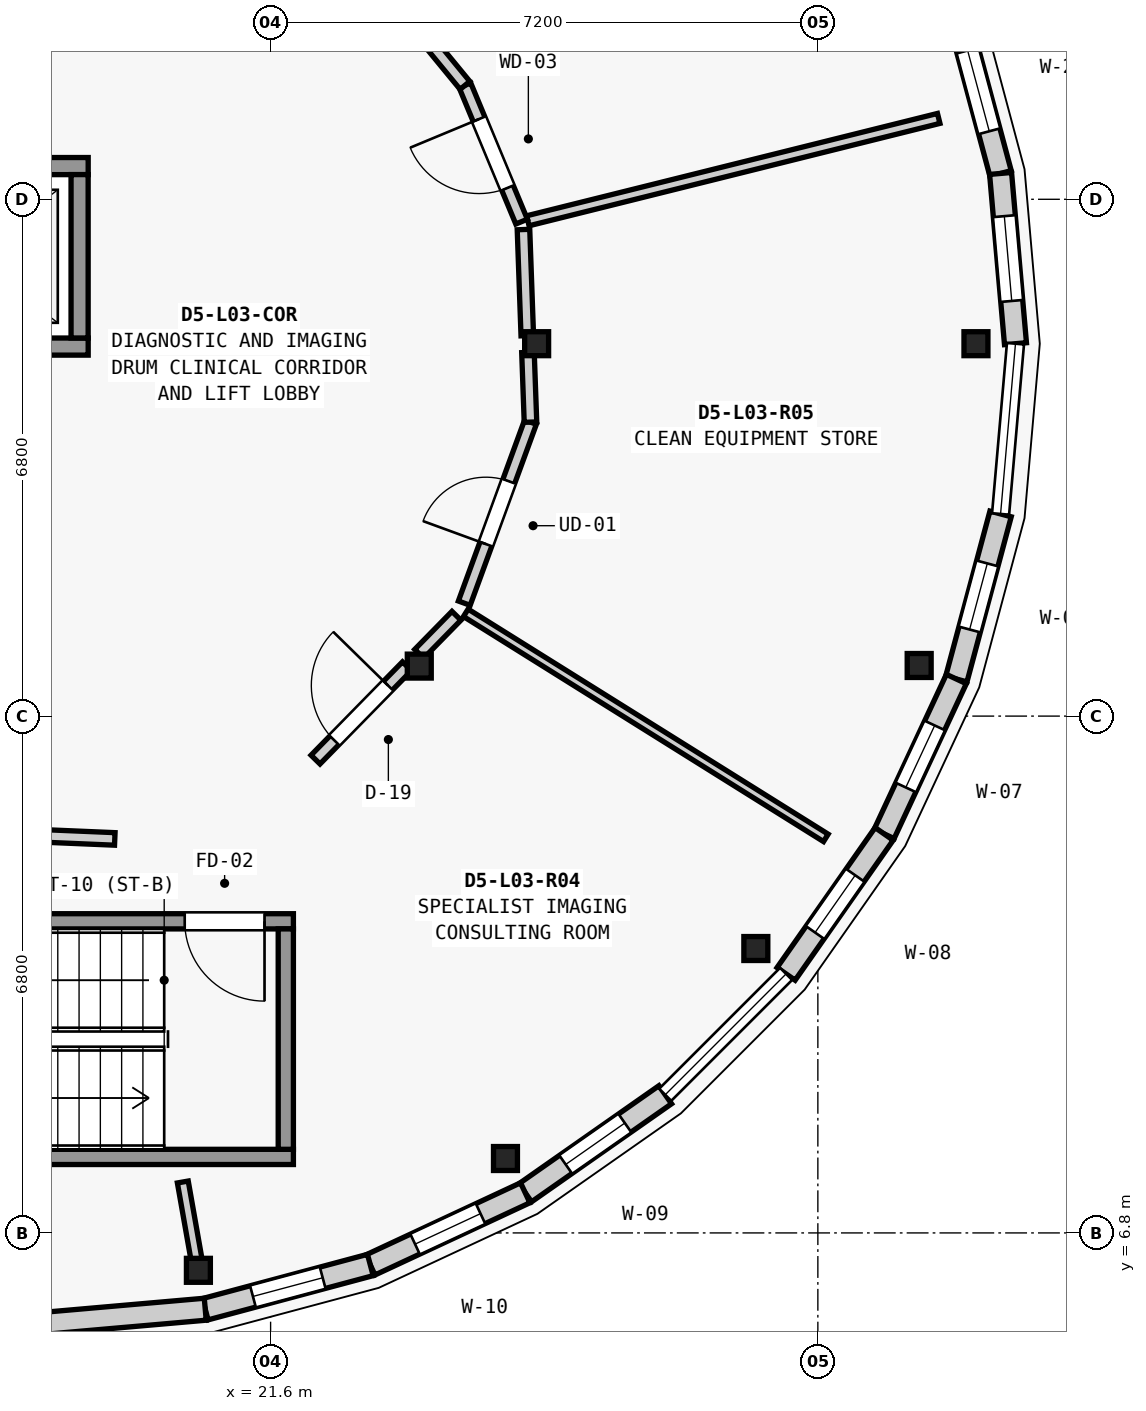
"""IFC4 building model, lengths in metres.
Left out: names, types, materials, properties, quantities, classifications, styles, units other than length and angle.
Written with IfcOpenShell. Run it as: python <this file> out.ifc"""

import sys

from ifc_helpers import new_model, si_unit, direction, frame, frame_2d, origin, origin_2d, place, context, subcontext, project, spatial, rectangle, extrude, element, fill, save


model = new_model("IFC4")
c1 = context("Model", 3, precision=1e-05, world=origin(), true_north=direction((0.0, 1.0)))
c2 = subcontext(c1, "Body", "Model", "MODEL_VIEW")
j1 = project(units=[si_unit("LENGTHUNIT", "METRE"), si_unit("PLANEANGLEUNIT", "RADIAN")], contexts=[c1])
p1 = place(None, origin())
s1 = spatial("IfcSite", under=j1, at=p1, CompositionType="ELEMENT")
p2 = place(p1, origin())
s2 = spatial("IfcBuilding", under=s1, at=p2, CompositionType="ELEMENT")
p3 = place(p2, frame((0.0, 0.0, 12.95)))
s3 = spatial("IfcBuildingStorey", under=s2, at=p3, CompositionType="ELEMENT", Elevation=12.95)
for number, where, z_axis, x_axis in (
    (1, (30.88, 18.5, 0.0), (0.0, 0.0, 1.0), (1.0, 0.0, 0.0)),
    (2, (20.65, 6.308, 0.0), (0.0, 0.0, 1.0), (1.0, 0.0, 0.0)),
    (3, (24.69, 7.779, 0.0), (0.0, 0.0, 1.0), (1.0, 0.0, 0.0)),
    (4, (27.984, 10.542, 0.0), (0.0, 0.0, 1.0), (1.0, 0.0, 0.0)),
    (5, (30.133, 14.266, 0.0), (0.0, 0.0, 1.0), (1.0, 0.0, 0.0)),
    (6, (25.1, 18.5, 0.0), (0.0, 0.0, 1.0), (1.0, 0.0, 0.0)),
    (7, (23.556, 14.258, 0.0), (0.0, 0.0, 1.0), (1.0, 0.0, 0.0)),
):
    element("IfcColumn", number, at=place(p3, frame(where, z_axis=z_axis, x_axis=x_axis)), inside=s3, PredefinedType="COLUMN", context=c2, shape_type="SweptSolid", body=[
        extrude(rectangle(XDim=0.315, YDim=0.315, at=origin_2d()), origin(), (0.0, 0.0, 1.0), 4.2),
    ])
p4 = place(p3, frame((31.204, 16.26, 0.0), z_axis=(0.0, 0.0, 1.0), x_axis=(-0.258824721145, -0.96592430538, 0.0)))
e8 = element("IfcWall", 8, at=p4, inside=s3, PredefinedType="ELEMENTEDWALL", context=c2, shape_type="SweptSolid", body=[
    extrude(rectangle(XDim=2.249, YDim=0.29, at=frame_2d((1.125, 0.0))), origin(), (0.0, 0.0, 1.0), 3.349),
])
p5 = place(p4, frame((0.674, 0.0, 0.85)))
e9 = element("IfcOpeningElement", 9, at=p5, cuts=e8, PredefinedType="OPENING", context=c2, shape_type="SweptSolid", body=[
    extrude(rectangle(XDim=0.9, YDim=1.65, at=frame_2d((0.45, 0.825))), frame((0.0, 0.155, 0.0), z_axis=(0.0, -1.0, 0.0), x_axis=(1.0, 0.0, 0.0)), (0.0, 0.0, 1.0), 0.31),
])
p6 = place(p3, frame((30.622, 14.088, 0.0), z_axis=(0.0, 0.0, 1.0), x_axis=(-0.422504983593, -0.906360600886, 0.0)))
e10 = element("IfcWall", 10, at=p6, inside=s3, PredefinedType="ELEMENTEDWALL", context=c2, shape_type="SweptSolid", body=[
    extrude(rectangle(XDim=2.248, YDim=0.29, at=frame_2d((1.124, 0.0))), origin(), (0.0, 0.0, 1.0), 3.349),
])
p7 = place(p6, frame((0.674, 0.0, 0.85)))
e11 = element("IfcOpeningElement", 11, at=p7, cuts=e10, PredefinedType="OPENING", context=c2, shape_type="SweptSolid", body=[
    extrude(rectangle(XDim=0.9, YDim=1.9, at=frame_2d((0.45, 0.95))), frame((0.0, 0.155, 0.0), z_axis=(0.0, -1.0, 0.0), x_axis=(1.0, 0.0, 0.0)), (0.0, 0.0, 1.0), 0.31),
])
p8 = place(p3, frame((29.672, 12.05, 0.0), z_axis=(0.0, 0.0, 1.0), x_axis=(-0.573644482107, -0.819104393925, 0.0)))
e12 = element("IfcWall", 12, at=p8, inside=s3, PredefinedType="ELEMENTEDWALL", context=c2, shape_type="SweptSolid", body=[
    extrude(rectangle(XDim=2.249, YDim=0.29, at=frame_2d((1.125, 0.0))), origin(), (0.0, 0.0, 1.0), 3.349),
])
p9 = place(p8, frame((0.664, 0.0, 0.85)))
e13 = element("IfcOpeningElement", 13, at=p9, cuts=e12, PredefinedType="OPENING", context=c2, shape_type="SweptSolid", body=[
    extrude(rectangle(XDim=0.92, YDim=1.55, at=frame_2d((0.46, 0.775))), frame((0.0, 0.155, 0.0), z_axis=(0.0, -1.0, 0.0), x_axis=(1.0, 0.0, 0.0)), (0.0, 0.0, 1.0), 0.31),
])
p10 = place(p3, frame((26.792, 8.618, 0.0), z_axis=(0.0, 0.0, 1.0), x_axis=(-0.819104393925, -0.573644482107, 0.0)))
e14 = element("IfcWall", 14, at=p10, inside=s3, PredefinedType="ELEMENTEDWALL", context=c2, shape_type="SweptSolid", body=[
    extrude(rectangle(XDim=2.249, YDim=0.29, at=frame_2d((1.125, 0.0))), origin(), (0.0, 0.0, 1.0), 3.349),
])
p11 = place(p10, frame((0.649, 0.0, 0.85)))
e15 = element("IfcOpeningElement", 15, at=p11, cuts=e14, PredefinedType="OPENING", context=c2, shape_type="SweptSolid", body=[
    extrude(rectangle(XDim=0.95, YDim=1.35, at=frame_2d((0.475, 0.675))), frame((0.0, 0.155, 0.0), z_axis=(0.0, -1.0, 0.0), x_axis=(1.0, 0.0, 0.0)), (0.0, 0.0, 1.0), 0.31),
])
p12 = place(p3, frame((24.95, 7.328, 0.0), z_axis=(0.0, 0.0, 1.0), x_axis=(-0.906360600886, -0.422504983593, 0.0)))
e16 = element("IfcWall", 16, at=p12, inside=s3, PredefinedType="ELEMENTEDWALL", context=c2, shape_type="SweptSolid", body=[
    extrude(rectangle(XDim=2.248, YDim=0.29, at=frame_2d((1.124, 0.0))), origin(), (0.0, 0.0, 1.0), 3.349),
])
p13 = place(p12, frame((0.649, 0.0, 0.85)))
e17 = element("IfcOpeningElement", 17, at=p13, cuts=e16, PredefinedType="OPENING", context=c2, shape_type="SweptSolid", body=[
    extrude(rectangle(XDim=0.95, YDim=1.6, at=frame_2d((0.475, 0.8))), frame((0.0, 0.155, 0.0), z_axis=(0.0, -1.0, 0.0), x_axis=(1.0, 0.0, 0.0)), (0.0, 0.0, 1.0), 0.31),
])
p14 = place(p3, frame((22.912, 6.378, 0.0), z_axis=(0.0, 0.0, 1.0), x_axis=(-0.96592430538, -0.258824721145, 0.0)))
e18 = element("IfcWall", 18, at=p14, inside=s3, PredefinedType="ELEMENTEDWALL", context=c2, shape_type="SweptSolid", body=[
    extrude(rectangle(XDim=2.249, YDim=0.29, at=frame_2d((1.125, 0.0))), origin(), (0.0, 0.0, 1.0), 3.349),
])
p15 = place(p14, frame((0.649, 0.0, 0.85)))
e19 = element("IfcOpeningElement", 19, at=p15, cuts=e18, PredefinedType="OPENING", context=c2, shape_type="SweptSolid", body=[
    extrude(rectangle(XDim=0.95, YDim=1.8, at=frame_2d((0.475, 0.9))), frame((0.0, 0.155, 0.0), z_axis=(0.0, -1.0, 0.0), x_axis=(1.0, 0.0, 0.0)), (0.0, 0.0, 1.0), 0.31),
])
p16 = place(p3, frame((20.74, 5.796, 0.0), z_axis=(0.0, 0.0, 1.0), x_axis=(-0.996201374201, -0.087079400775, 0.0)))
e20 = element("IfcWall", 20, at=p16, inside=s3, PredefinedType="ELEMENTEDWALL", context=c2, shape_type="SweptSolid", body=[
    extrude(rectangle(XDim=2.249, YDim=0.29, at=frame_2d((1.124, 0.0))), origin(), (0.0, 0.0, 1.0), 3.349),
])
p17 = place(p3, frame((30.622, 22.912, 0.0), z_axis=(0.0, 0.0, 1.0), x_axis=(0.258824721145, -0.96592430538, 0.0)))
e21 = element("IfcWall", 21, at=p17, inside=s3, PredefinedType="ELEMENTEDWALL", context=c2, shape_type="SweptSolid", body=[
    extrude(rectangle(XDim=2.249, YDim=0.29, at=frame_2d((1.125, 0.0))), origin(), (0.0, 0.0, 1.0), 3.349),
])
p18 = place(p17, frame((0.574, 0.0, 0.85)))
e22 = element("IfcOpeningElement", 22, at=p18, cuts=e21, PredefinedType="OPENING", context=c2, shape_type="SweptSolid", body=[
    extrude(rectangle(XDim=1.1, YDim=2.1, at=frame_2d((0.55, 1.05))), frame((0.0, 0.155, 0.0), z_axis=(0.0, -1.0, 0.0), x_axis=(1.0, 0.0, 0.0)), (0.0, 0.0, 1.0), 0.31),
])
p19 = place(p3, frame((31.204, 20.74, 0.0), z_axis=(0.0, 0.0, 1.0), x_axis=(0.087079400775, -0.996201374201, 0.0)))
e23 = element("IfcWall", 23, at=p19, inside=s3, PredefinedType="ELEMENTEDWALL", context=c2, shape_type="SweptSolid", body=[
    extrude(rectangle(XDim=2.249, YDim=0.29, at=frame_2d((1.124, 0.0))), origin(), (0.0, 0.0, 1.0), 3.349),
])
p20 = place(p19, frame((0.564, 0.0, 0.85)))
e24 = element("IfcOpeningElement", 24, at=p20, cuts=e23, PredefinedType="OPENING", context=c2, shape_type="SweptSolid", body=[
    extrude(rectangle(XDim=1.12, YDim=1.65, at=frame_2d((0.56, 0.825))), frame((0.0, 0.155, 0.0), z_axis=(0.0, -1.0, 0.0), x_axis=(1.0, 0.0, 0.0)), (0.0, 0.0, 1.0), 0.31),
])
p21 = place(p3, frame((21.9, 10.9, 0.0), z_axis=(0.0, 0.0, 1.0), x_axis=(-1.0, 0.0, 0.0)))
e25 = element("IfcWall", 25, at=p21, inside=s3, PredefinedType="SHEAR", context=c2, shape_type="SweptSolid", body=[
    extrude(rectangle(XDim=6.8, YDim=0.2, at=frame_2d((3.4, 0.0))), origin(), (0.0, 0.0, 1.0), 3.995),
])
p22 = place(p21, frame((0.38, 0.0, 0.0)))
e26 = element("IfcOpeningElement", 26, at=p22, cuts=e25, PredefinedType="OPENING", context=c2, shape_type="SweptSolid", body=[
    extrude(rectangle(XDim=1.05, YDim=2.15, at=frame_2d((0.525, 1.075))), frame((0.0, 0.11, 0.0), z_axis=(0.0, -1.0, 0.0), x_axis=(1.0, 0.0, 0.0)), (0.0, 0.0, 1.0), 0.22),
])
p23 = place(p3, frame((21.9, 7.8, 0.0), z_axis=(0.0, 0.0, 1.0), x_axis=(-1.0, 0.0, 0.0)))
e27 = element("IfcWall", 27, at=p23, inside=s3, PredefinedType="SHEAR", context=c2, shape_type="SweptSolid", body=[
    extrude(rectangle(XDim=6.8, YDim=0.2, at=frame_2d((3.4, 0.0))), origin(), (0.0, 0.0, 1.0), 3.995),
])
p24 = place(p3, frame((21.8, 10.8, 0.0), z_axis=(0.0, 0.0, 1.0), x_axis=(0.0, -1.0, 0.0)))
e28 = element("IfcWall", 28, at=p24, inside=s3, PredefinedType="SHEAR", context=c2, shape_type="SweptSolid", body=[
    extrude(rectangle(XDim=2.9, YDim=0.2, at=frame_2d((1.45, 0.0))), origin(), (0.0, 0.0, 1.0), 3.995),
])
p25 = place(p3, frame((16.1, 18.462, 0.0), z_axis=(0.0, 0.0, 1.0), x_axis=(1.0, 0.0, 0.0)))
e29 = element("IfcWall", 29, at=p25, inside=s3, PredefinedType="SHEAR", context=c2, shape_type="SweptSolid", body=[
    extrude(rectangle(XDim=3.1, YDim=0.225, at=frame_2d((1.55, 0.0))), origin(), (0.0, 0.0, 1.0), 3.995),
])
p26 = place(p25, frame((0.9, 0.0, 0.0)))
e30 = element("IfcOpeningElement", 30, at=p26, cuts=e29, PredefinedType="OPENING", context=c2, shape_type="SweptSolid", body=[
    extrude(rectangle(XDim=1.3, YDim=2.2, at=frame_2d((0.65, 1.1))), frame((0.0, 0.123, 0.0), z_axis=(0.0, -1.0, 0.0), x_axis=(1.0, 0.0, 0.0)), (0.0, 0.0, 1.0), 0.245),
])
p27 = place(p3, frame((16.1, 20.837, 0.0), z_axis=(0.0, 0.0, 1.0), x_axis=(1.0, 0.0, 0.0)))
e31 = element("IfcWall", 31, at=p27, inside=s3, PredefinedType="SHEAR", context=c2, shape_type="SweptSolid", body=[
    extrude(rectangle(XDim=3.1, YDim=0.225, at=frame_2d((1.55, 0.0))), origin(), (0.0, 0.0, 1.0), 3.995),
])
p28 = place(p3, frame((19.087, 18.575, 0.0), z_axis=(0.0, 0.0, 1.0), x_axis=(0.0, 1.0, 0.0)))
e32 = element("IfcWall", 32, at=p28, inside=s3, PredefinedType="SHEAR", context=c2, shape_type="SweptSolid", body=[
    extrude(rectangle(XDim=2.15, YDim=0.225, at=frame_2d((1.075, 0.0))), origin(), (0.0, 0.0, 1.0), 3.995),
])
p29 = place(p3, frame((20.445, 7.47, 0.0), z_axis=(0.0, 0.0, 1.0), x_axis=(0.173759982235, -0.984788032306, 0.0)))
e33 = element("IfcWall", 33, at=p29, inside=s3, PredefinedType="PARTITIONING", context=c2, shape_type="SweptSolid", body=[
    extrude(rectangle(XDim=1.099, YDim=0.145, at=frame_2d((0.549, 0.0))), origin(), (0.0, 0.0, 1.0), 3.324),
])
p30 = place(p3, frame((24.168, 14.959, 0.0), z_axis=(0.0, 0.0, 1.0), x_axis=(0.847976206066, -0.530034295066, 0.0)))
e34 = element("IfcWall", 34, at=p30, inside=s3, PredefinedType="PARTITIONING", context=c2, shape_type="SweptSolid", body=[
    extrude(rectangle(XDim=5.586, YDim=0.115, at=frame_2d((2.793, 0.0))), origin(), (0.0, 0.0, 1.0), 3.324),
])
p31 = place(p3, frame((24.984, 20.117, 0.0), z_axis=(0.0, 0.0, 1.0), x_axis=(0.970325240459, 0.2418034899, 0.0)))
e35 = element("IfcWall", 35, at=p31, inside=s3, PredefinedType="PLUMBINGWALL", context=c2, shape_type="SweptSolid", body=[
    extrude(rectangle(XDim=5.571, YDim=0.135, at=frame_2d((2.786, 0.0))), origin(), (0.0, 0.0, 1.0), 3.324),
])
p32 = place(p3, frame((16.903, 12.096, 0.0), z_axis=(0.0, 0.0, 1.0), x_axis=(0.99910506135, -0.042297474927, 0.0)))
e36 = element("IfcWall", 36, at=p32, inside=s3, PredefinedType="PARTITIONING", context=c2, shape_type="SweptSolid", body=[
    extrude(rectangle(XDim=2.649, YDim=0.165, at=frame_2d((1.325, 0.0))), origin(), (0.0, 0.0, 1.0), 3.324),
])
p33 = place(p3, frame((22.191, 13.028, 0.0), z_axis=(0.0, 0.0, 1.0), x_axis=(0.699827160014, 0.714312218926, 0.0)))
e37 = element("IfcWall", 37, at=p33, inside=s3, PredefinedType="PARTITIONING", context=c2, shape_type="SweptSolid", body=[
    extrude(rectangle(XDim=1.719, YDim=0.165, at=frame_2d((0.86, 0.0))), origin(), (0.0, 0.0, 1.0), 3.324),
])
p34 = place(p33, frame((0.354, 0.0, 0.0)))
e38 = element("IfcOpeningElement", 38, at=p34, cuts=e37, PredefinedType="OPENING", context=c2, shape_type="SweptSolid", body=[
    extrude(rectangle(XDim=1.01, YDim=2.15, at=frame_2d((0.505, 1.075))), frame((0.0, 0.093, 0.0), z_axis=(0.0, -1.0, 0.0), x_axis=(1.0, 0.0, 0.0)), (0.0, 0.0, 1.0), 0.185),
])
p35 = place(p3, frame((23.555, 14.42, 0.0), z_axis=(0.0, 0.0, 1.0), x_axis=(0.699921466631, 0.714219812487, 0.0)))
e39 = element("IfcWall", 39, at=p35, inside=s3, PredefinedType="PARTITIONING", context=c2, shape_type="SweptSolid", body=[
    extrude(rectangle(XDim=0.7, YDim=0.165, at=frame_2d((0.35, 0.0))), origin(), (0.0, 0.0, 1.0), 3.324),
])
p36 = place(p3, frame((24.148, 15.086, 0.0), z_axis=(0.0, 0.0, 1.0), x_axis=(0.343442799129, 0.939173596161, 0.0)))
e40 = element("IfcWall", 40, at=p36, inside=s3, PredefinedType="PARTITIONING", context=c2, shape_type="SweptSolid", body=[
    extrude(rectangle(XDim=2.536, YDim=0.165, at=frame_2d((1.268, 0.0))), origin(), (0.0, 0.0, 1.0), 3.324),
])
p37 = place(p36, frame((0.828, 0.0, 0.0)))
e41 = element("IfcOpeningElement", 41, at=p37, cuts=e40, PredefinedType="OPENING", context=c2, shape_type="SweptSolid", body=[
    extrude(rectangle(XDim=0.88, YDim=2.1, at=frame_2d((0.44, 1.05))), frame((0.0, 0.093, 0.0), z_axis=(0.0, -1.0, 0.0), x_axis=(1.0, 0.0, 0.0)), (0.0, 0.0, 1.0), 0.185),
])
p38 = place(p3, frame((25.019, 17.468, 0.0), z_axis=(0.0, 0.0, 1.0), x_axis=(-0.0359192981, 0.999354693802, 0.0)))
e42 = element("IfcWall", 42, at=p38, inside=s3, PredefinedType="PARTITIONING", context=c2, shape_type="SweptSolid", body=[
    extrude(rectangle(XDim=0.917, YDim=0.165, at=frame_2d((0.459, 0.0))), origin(), (0.0, 0.0, 1.0), 3.324),
])
p39 = place(p3, frame((24.977, 18.606, 0.0), z_axis=(0.0, 0.0, 1.0), x_axis=(-0.035828677701, 0.999357946811, 0.0)))
e43 = element("IfcWall", 43, at=p39, inside=s3, PredefinedType="PARTITIONING", context=c2, shape_type="SweptSolid", body=[
    extrude(rectangle(XDim=1.397, YDim=0.165, at=frame_2d((0.698, 0.0))), origin(), (0.0, 0.0, 1.0), 3.324),
])
p40 = place(p3, frame((24.902, 20.106, 0.0), z_axis=(0.0, 0.0, 1.0), x_axis=(-0.383758104383, 0.923433656155, 0.0)))
e44 = element("IfcWall", 44, at=p40, inside=s3, PredefinedType="PARTITIONING", context=c2, shape_type="SweptSolid", body=[
    extrude(rectangle(XDim=1.942, YDim=0.165, at=frame_2d((0.971, 0.0))), origin(), (0.0, 0.0, 1.0), 3.324),
])
p41 = place(p40, frame((0.481, 0.0, 0.0)))
e45 = element("IfcOpeningElement", 45, at=p41, cuts=e44, PredefinedType="OPENING", context=c2, shape_type="SweptSolid", body=[
    extrude(rectangle(XDim=0.98, YDim=2.1, at=frame_2d((0.49, 1.05))), frame((0.0, 0.093, 0.0), z_axis=(0.0, -1.0, 0.0), x_axis=(1.0, 0.0, 0.0)), (0.0, 0.0, 1.0), 0.185),
])
p42 = place(p3, frame((24.157, 21.899, 0.0), z_axis=(0.0, 0.0, 1.0), x_axis=(-0.634915552235, 0.772581543612, 0.0)))
e46 = element("IfcWall", 46, at=p42, inside=s3, PredefinedType="PARTITIONING", context=c2, shape_type="SweptSolid", body=[
    extrude(rectangle(XDim=0.887, YDim=0.165, at=frame_2d((0.443, 0.0))), origin(), (0.0, 0.0, 1.0), 3.324),
])
p43 = place(p5, origin())
e47 = element("IfcWindow", 47, at=p43, inside=s3, PartitioningType="SINGLE_PANEL", PredefinedType="WINDOW", context=c2, shape_type="SweptSolid", body=[
    extrude(rectangle(XDim=0.9, YDim=1.65, at=frame_2d((0.45, 0.825))), frame((0.0, 0.03, 0.0), z_axis=(0.0, -1.0, 0.0), x_axis=(1.0, 0.0, 0.0)), (0.0, 0.0, 1.0), 0.06),
])
fill(e9, e47)
p44 = place(p7, origin())
e48 = element("IfcWindow", 48, at=p44, inside=s3, PartitioningType="SINGLE_PANEL", PredefinedType="WINDOW", context=c2, shape_type="SweptSolid", body=[
    extrude(rectangle(XDim=0.9, YDim=1.9, at=frame_2d((0.45, 0.95))), frame((0.0, 0.03, 0.0), z_axis=(0.0, -1.0, 0.0), x_axis=(1.0, 0.0, 0.0)), (0.0, 0.0, 1.0), 0.06),
])
fill(e11, e48)
p45 = place(p9, origin())
e49 = element("IfcWindow", 49, at=p45, inside=s3, PartitioningType="SINGLE_PANEL", PredefinedType="WINDOW", context=c2, shape_type="SweptSolid", body=[
    extrude(rectangle(XDim=0.92, YDim=1.55, at=frame_2d((0.46, 0.775))), frame((0.0, 0.03, 0.0), z_axis=(0.0, -1.0, 0.0), x_axis=(1.0, 0.0, 0.0)), (0.0, 0.0, 1.0), 0.06),
])
fill(e13, e49)
p46 = place(p11, origin())
e50 = element("IfcWindow", 50, at=p46, inside=s3, PartitioningType="SINGLE_PANEL", PredefinedType="WINDOW", context=c2, shape_type="SweptSolid", body=[
    extrude(rectangle(XDim=0.95, YDim=1.35, at=frame_2d((0.475, 0.675))), frame((0.0, 0.03, 0.0), z_axis=(0.0, -1.0, 0.0), x_axis=(1.0, 0.0, 0.0)), (0.0, 0.0, 1.0), 0.06),
])
fill(e15, e50)
p47 = place(p13, origin())
e51 = element("IfcWindow", 51, at=p47, inside=s3, PartitioningType="SINGLE_PANEL", PredefinedType="WINDOW", context=c2, shape_type="SweptSolid", body=[
    extrude(rectangle(XDim=0.95, YDim=1.6, at=frame_2d((0.475, 0.8))), frame((0.0, 0.03, 0.0), z_axis=(0.0, -1.0, 0.0), x_axis=(1.0, 0.0, 0.0)), (0.0, 0.0, 1.0), 0.06),
])
fill(e17, e51)
p48 = place(p15, origin())
e52 = element("IfcWindow", 52, at=p48, inside=s3, PartitioningType="SINGLE_PANEL", PredefinedType="WINDOW", context=c2, shape_type="SweptSolid", body=[
    extrude(rectangle(XDim=0.95, YDim=1.8, at=frame_2d((0.475, 0.9))), frame((0.0, 0.03, 0.0), z_axis=(0.0, -1.0, 0.0), x_axis=(1.0, 0.0, 0.0)), (0.0, 0.0, 1.0), 0.06),
])
fill(e19, e52)
p49 = place(p18, origin())
e53 = element("IfcWindow", 53, at=p49, inside=s3, PartitioningType="SINGLE_PANEL", PredefinedType="WINDOW", context=c2, shape_type="SweptSolid", body=[
    extrude(rectangle(XDim=1.1, YDim=2.1, at=frame_2d((0.55, 1.05))), frame((0.0, 0.03, 0.0), z_axis=(0.0, -1.0, 0.0), x_axis=(1.0, 0.0, 0.0)), (0.0, 0.0, 1.0), 0.06),
])
fill(e22, e53)
p50 = place(p20, origin())
e54 = element("IfcWindow", 54, at=p50, inside=s3, PartitioningType="SINGLE_PANEL", PredefinedType="WINDOW", context=c2, shape_type="SweptSolid", body=[
    extrude(rectangle(XDim=1.12, YDim=1.65, at=frame_2d((0.56, 0.825))), frame((0.0, 0.03, 0.0), z_axis=(0.0, -1.0, 0.0), x_axis=(1.0, 0.0, 0.0)), (0.0, 0.0, 1.0), 0.06),
])
fill(e24, e54)
p51 = place(p22, origin())
e55 = element("IfcDoor", 55, at=p51, inside=s3, OperationType="SINGLE_SWING_LEFT", PredefinedType="DOOR", context=c2, shape_type="SweptSolid", body=[
    extrude(rectangle(XDim=1.05, YDim=2.15, at=frame_2d((0.525, 1.075))), frame((0.0, 0.025, 0.0), z_axis=(0.0, -1.0, 0.0), x_axis=(1.0, 0.0, 0.0)), (0.0, 0.0, 1.0), 0.05),
])
fill(e26, e55)
p52 = place(p34, origin())
e56 = element("IfcDoor", 56, at=p52, inside=s3, OperationType="SINGLE_SWING_RIGHT", PredefinedType="DOOR", context=c2, shape_type="SweptSolid", body=[
    extrude(rectangle(XDim=1.01, YDim=2.15, at=frame_2d((0.505, 1.075))), frame((0.0, 0.025, 0.0), z_axis=(0.0, -1.0, 0.0), x_axis=(1.0, 0.0, 0.0)), (0.0, 0.0, 1.0), 0.05),
])
fill(e38, e56)
p53 = place(p37, origin())
e57 = element("IfcDoor", 57, at=p53, inside=s3, OperationType="SINGLE_SWING_LEFT", PredefinedType="DOOR", context=c2, shape_type="SweptSolid", body=[
    extrude(rectangle(XDim=0.88, YDim=2.1, at=frame_2d((0.44, 1.05))), frame((0.0, 0.025, 0.0), z_axis=(0.0, -1.0, 0.0), x_axis=(1.0, 0.0, 0.0)), (0.0, 0.0, 1.0), 0.05),
])
fill(e41, e57)
p54 = place(p41, origin())
e58 = element("IfcDoor", 58, at=p54, inside=s3, OperationType="SINGLE_SWING_RIGHT", PredefinedType="DOOR", context=c2, shape_type="SweptSolid", body=[
    extrude(rectangle(XDim=0.98, YDim=2.1, at=frame_2d((0.49, 1.05))), frame((0.0, 0.025, 0.0), z_axis=(0.0, -1.0, 0.0), x_axis=(1.0, 0.0, 0.0)), (0.0, 0.0, 1.0), 0.05),
])
fill(e45, e58)
save(model, sys.argv[1])
